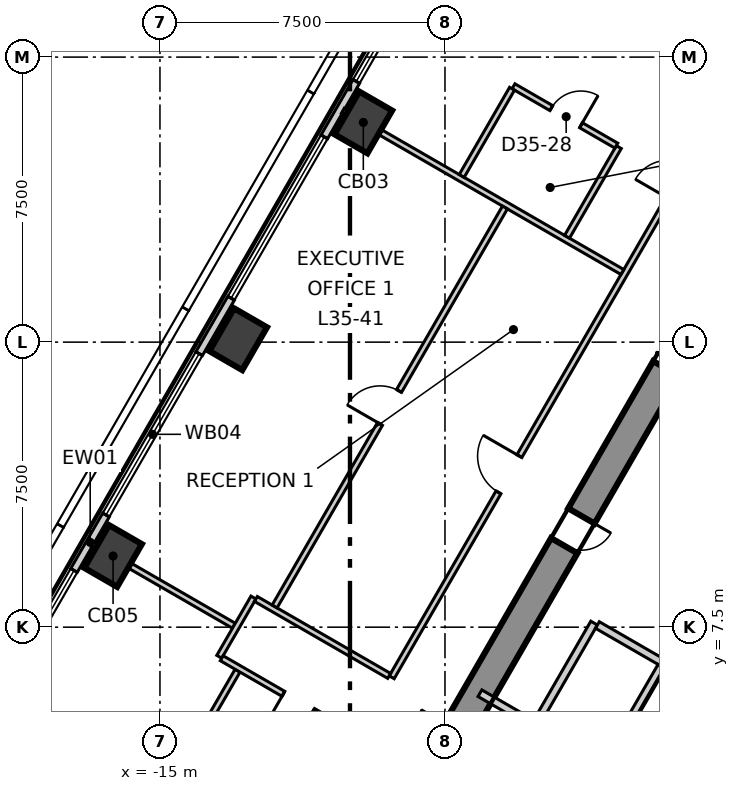
"""IFC4 building model, lengths in metres.
Left out: names, types, materials, properties, quantities, classifications, styles, units other than length and angle.
Written with IfcOpenShell. Run it as: python <this file> out.ifc"""

import sys

from ifc_helpers import new_model, si_unit, direction, frame, frame_2d, origin, origin_2d, place, context, subcontext, project, spatial, polyline, rectangle, outline, extrude, element, fill, save


model = new_model("IFC4")
c1 = context("Model", 3, precision=1e-05, world=origin(), true_north=direction((0.0, 1.0)))
c2 = subcontext(c1, "Body", "Model", "MODEL_VIEW")
j1 = project(units=[si_unit("LENGTHUNIT", "METRE"), si_unit("PLANEANGLEUNIT", "RADIAN")], contexts=[c1])
p1 = place(None, origin())
s1 = spatial("IfcSite", under=j1, at=p1, CompositionType="ELEMENT")
p2 = place(p1, origin())
s2 = spatial("IfcBuilding", under=s1, at=p2, CompositionType="ELEMENT")
p3 = place(p2, frame((0.0, 0.0, 152.3)))
s3 = spatial("IfcBuildingStorey", under=s2, at=p3, CompositionType="ELEMENT", Elevation=152.3)
p4 = place(p3, frame((1.674, 14.3, -0.3), z_axis=(0.0, 0.0, 1.0), x_axis=(-1.0, 0.0, 0.0)))
e1 = element("IfcWall", 1, at=p4, inside=s3, PredefinedType="SHEAR", context=c2, shape_type="SweptSolid", body=[
    extrude(outline(polyline([(-0.231, -0.4), (1.674, -0.4), (3.579, -0.4), (3.117, 0.4), (1.674, 0.4), (0.231, 0.4), (-0.231, -0.4)])), origin(), (0.0, 0.0, 1.0), 4.0),
])
p5 = place(p4, frame((0.974, 0.0, 0.3)))
e2 = element("IfcOpeningElement", 2, at=p5, cuts=e1, PredefinedType="OPENING", context=c2, shape_type="SweptSolid", body=[
    extrude(rectangle(XDim=1.4, YDim=2.1, at=frame_2d((0.7, 1.05))), frame((0.0, 0.41, 0.0), z_axis=(0.0, -1.0, 0.0), x_axis=(1.0, 0.0, 0.0)), (0.0, 0.0, 1.0), 0.82),
])
p6 = place(p3, frame((-1.674, 14.3, -0.3), z_axis=(0.0, 0.0, 1.0), x_axis=(-0.499995765644, -0.866027848477, 0.0)))
e3 = element("IfcWall", 3, at=p6, inside=s3, PredefinedType="SHEAR", context=c2, shape_type="SweptSolid", body=[
    extrude(outline(polyline([(-0.231, -0.4), (1.732, -0.4), (3.695, -0.4), (5.658, -0.4), (7.621, -0.4), (9.584, -0.4), (11.547, -0.4), (13.51, -0.4), (15.473, -0.4), (17.436, -0.4), (19.399, -0.4), (21.362, -0.4), (23.325, -0.4), (22.863, 0.4), (20.977, 0.4), (19.091, 0.4), (17.205, 0.4), (15.319, 0.4), (13.433, 0.4), (11.547, 0.4), (9.661, 0.4), (7.775, 0.4), (5.889, 0.4), (4.003, 0.4), (2.117, 0.4), (0.231, 0.4), (-0.231, -0.4)])), origin(), (0.0, 0.0, 1.0), 4.0),
])
p7 = place(p6, frame((10.997, 0.0, 0.3)))
e4 = element("IfcOpeningElement", 4, at=p7, cuts=e3, PredefinedType="OPENING", context=c2, shape_type="SweptSolid", body=[
    extrude(rectangle(XDim=1.1, YDim=2.1, at=frame_2d((0.55, 1.05))), frame((0.0, 0.41, 0.0), z_axis=(0.0, -1.0, 0.0), x_axis=(1.0, 0.0, 0.0)), (0.0, 0.0, 1.0), 0.82),
])
p8 = place(p6, frame((4.474, 0.0, 0.3)))
e5 = element("IfcOpeningElement", 5, at=p8, cuts=e3, PredefinedType="OPENING", context=c2, shape_type="SweptSolid", body=[
    extrude(rectangle(XDim=0.9, YDim=2.1, at=frame_2d((0.45, 1.05))), frame((0.0, 0.41, 0.0), z_axis=(0.0, -1.0, 0.0), x_axis=(1.0, 0.0, 0.0)), (0.0, 0.0, 1.0), 0.82),
])
for number, where, z_axis, x_axis in (
    (6, (-9.649, 20.781, -0.3), (0.0, 0.0, 1.0), (0.5, 0.866, 0.0)),
    (7, (-12.942, 15.077, -0.3), (0.0, 0.0, 1.0), (0.5, 0.866, 0.0)),
    (8, (-16.234, 9.373, -0.3), (0.0, 0.0, 1.0), (0.5, 0.866, 0.0)),
):
    element("IfcColumn", number, at=place(p3, frame(where, z_axis=z_axis, x_axis=x_axis)), inside=s3, PredefinedType="COLUMN", context=c2, shape_type="SweptSolid", body=[
        extrude(rectangle(XDim=1.3, YDim=1.0, at=origin_2d()), origin(), (0.0, 0.0, 1.0), 4.0),
    ])
p9 = place(p3, frame((-3.018, 33.666, 0.0), z_axis=(0.0, 0.0, 1.0), x_axis=(-0.499984613623, -0.866034286931, 0.0)))
e9 = element("IfcWall", 9, at=p9, inside=s3, PredefinedType="ELEMENTEDWALL", context=c2, shape_type="SweptSolid", body=[
    extrude(rectangle(XDim=55.274, YDim=0.2, at=frame_2d((27.637, 0.0))), origin(), (0.0, 0.0, 1.0), 3.7),
])
p10 = place(p9, frame((2.145, 0.0, 0.9)))
e10 = element("IfcOpeningElement", 10, at=p10, cuts=e9, PredefinedType="OPENING", context=c2, shape_type="SweptSolid", body=[
    extrude(rectangle(XDim=4.9, YDim=2.5, at=frame_2d((2.45, 1.25))), frame((0.0, 0.11, 0.0), z_axis=(0.0, -1.0, 0.0), x_axis=(1.0, 0.0, 0.0)), (0.0, 0.0, 1.0), 0.22),
])
p11 = place(p9, frame((8.731, 0.0, 0.9)))
e11 = element("IfcOpeningElement", 11, at=p11, cuts=e9, PredefinedType="OPENING", context=c2, shape_type="SweptSolid", body=[
    extrude(rectangle(XDim=4.9, YDim=2.5, at=frame_2d((2.45, 1.25))), frame((0.0, 0.11, 0.0), z_axis=(0.0, -1.0, 0.0), x_axis=(1.0, 0.0, 0.0)), (0.0, 0.0, 1.0), 0.22),
])
p12 = place(p9, frame((15.318, 0.0, 0.9)))
e12 = element("IfcOpeningElement", 12, at=p12, cuts=e9, PredefinedType="OPENING", context=c2, shape_type="SweptSolid", body=[
    extrude(rectangle(XDim=4.9, YDim=2.5, at=frame_2d((2.45, 1.25))), frame((0.0, 0.11, 0.0), z_axis=(0.0, -1.0, 0.0), x_axis=(1.0, 0.0, 0.0)), (0.0, 0.0, 1.0), 0.22),
])
p13 = place(p9, frame((21.904, 0.0, 0.9)))
e13 = element("IfcOpeningElement", 13, at=p13, cuts=e9, PredefinedType="OPENING", context=c2, shape_type="SweptSolid", body=[
    extrude(rectangle(XDim=4.9, YDim=2.5, at=frame_2d((2.45, 1.25))), frame((0.0, 0.11, 0.0), z_axis=(0.0, -1.0, 0.0), x_axis=(1.0, 0.0, 0.0)), (0.0, 0.0, 1.0), 0.22),
])
p14 = place(p9, frame((28.49, 0.0, 0.9)))
e14 = element("IfcOpeningElement", 14, at=p14, cuts=e9, PredefinedType="OPENING", context=c2, shape_type="SweptSolid", body=[
    extrude(rectangle(XDim=4.9, YDim=2.5, at=frame_2d((2.45, 1.25))), frame((0.0, 0.11, 0.0), z_axis=(0.0, -1.0, 0.0), x_axis=(1.0, 0.0, 0.0)), (0.0, 0.0, 1.0), 0.22),
])
p15 = place(p9, frame((35.076, 0.0, 0.9)))
e15 = element("IfcOpeningElement", 15, at=p15, cuts=e9, PredefinedType="OPENING", context=c2, shape_type="SweptSolid", body=[
    extrude(rectangle(XDim=4.9, YDim=2.5, at=frame_2d((2.45, 1.25))), frame((0.0, 0.11, 0.0), z_axis=(0.0, -1.0, 0.0), x_axis=(1.0, 0.0, 0.0)), (0.0, 0.0, 1.0), 0.22),
])
p16 = place(p9, frame((41.662, 0.0, 0.9)))
e16 = element("IfcOpeningElement", 16, at=p16, cuts=e9, PredefinedType="OPENING", context=c2, shape_type="SweptSolid", body=[
    extrude(rectangle(XDim=4.9, YDim=2.5, at=frame_2d((2.45, 1.25))), frame((0.0, 0.11, 0.0), z_axis=(0.0, -1.0, 0.0), x_axis=(1.0, 0.0, 0.0)), (0.0, 0.0, 1.0), 0.22),
])
p17 = place(p9, frame((48.248, 0.0, 0.9)))
e17 = element("IfcOpeningElement", 17, at=p17, cuts=e9, PredefinedType="OPENING", context=c2, shape_type="SweptSolid", body=[
    extrude(rectangle(XDim=4.9, YDim=2.5, at=frame_2d((2.45, 1.25))), frame((0.0, 0.11, 0.0), z_axis=(0.0, -1.0, 0.0), x_axis=(1.0, 0.0, 0.0)), (0.0, 0.0, 1.0), 0.22),
])
p18 = place(p3, frame((-8.902, 6.181, 0.0), z_axis=(0.0, 0.0, 1.0), x_axis=(0.499992688384, 0.866029625107, 0.0)))
e18 = element("IfcWall", 18, at=p18, inside=s3, PredefinedType="PARTITIONING", context=c2, shape_type="SweptSolid", body=[
    extrude(rectangle(XDim=17.804, YDim=0.15, at=frame_2d((8.902, 0.0))), origin(), (0.0, 0.0, 1.0), 3.7),
])
p19 = place(p18, frame((14.554, 0.0, 0.0)))
e19 = element("IfcOpeningElement", 19, at=p19, cuts=e18, PredefinedType="OPENING", context=c2, shape_type="SweptSolid", body=[
    extrude(rectangle(XDim=1.0, YDim=2.1, at=frame_2d((0.5, 1.05))), frame((0.0, 0.085, 0.0), z_axis=(0.0, -1.0, 0.0), x_axis=(1.0, 0.0, 0.0)), (0.0, 0.0, 1.0), 0.17),
])
p20 = place(p18, frame((5.62, 0.0, 0.0)))
e20 = element("IfcOpeningElement", 20, at=p20, cuts=e18, PredefinedType="OPENING", context=c2, shape_type="SweptSolid", body=[
    extrude(rectangle(XDim=1.1, YDim=2.1, at=frame_2d((0.55, 1.05))), frame((0.0, 0.085, 0.0), z_axis=(0.0, -1.0, 0.0), x_axis=(1.0, 0.0, 0.0)), (0.0, 0.0, 1.0), 0.17),
])
p21 = place(p3, frame((-16.771, 9.683, 0.0), z_axis=(0.0, 0.0, 1.0), x_axis=(0.866070942811, -0.499921115796, 0.0)))
e21 = element("IfcWall", 21, at=p21, inside=s3, PredefinedType="PARTITIONING", context=c2, shape_type="SweptSolid", body=[
    extrude(rectangle(XDim=4.291, YDim=0.15, at=frame_2d((2.146, 0.0))), origin(), (0.0, 0.0, 1.0), 3.2),
])
p22 = place(p3, frame((-17.321, -1.2, 0.0), z_axis=(0.0, 0.0, 1.0), x_axis=(0.500054279689, 0.865994063124, 0.0)))
e22 = element("IfcWall", 22, at=p22, inside=s3, PredefinedType="PARTITIONING", context=c2, shape_type="SweptSolid", body=[
    extrude(rectangle(XDim=8.725, YDim=0.15, at=frame_2d((4.363, 0.0))), origin(), (0.0, 0.0, 1.0), 3.7),
])
p23 = place(p3, frame((-13.44, 6.721, 0.0), z_axis=(0.0, 0.0, 1.0), x_axis=(0.499902469156, 0.866081705922, 0.0)))
e23 = element("IfcWall", 23, at=p23, inside=s3, PredefinedType="PARTITIONING", context=c2, shape_type="SweptSolid", body=[
    extrude(rectangle(XDim=1.8, YDim=0.15, at=frame_2d((0.9, 0.0))), origin(), (0.0, 0.0, 1.0), 3.7),
])
p24 = place(p3, frame((-12.475, 8.242, 0.0), z_axis=(0.0, 0.0, 1.0), x_axis=(0.866060059865, -0.499939969103, 0.0)))
e24 = element("IfcWall", 24, at=p24, inside=s3, PredefinedType="PARTITIONING", context=c2, shape_type="SweptSolid", body=[
    extrude(rectangle(XDim=4.048, YDim=0.15, at=frame_2d((2.024, 0.0))), origin(), (0.0, 0.0, 1.0), 3.7),
])
p25 = place(p3, frame((-13.375, 6.683, 0.0), z_axis=(0.0, 0.0, 1.0), x_axis=(0.866033948129, -0.499985200469, 0.0)))
e25 = element("IfcWall", 25, at=p25, inside=s3, PredefinedType="PARTITIONING", context=c2, shape_type="SweptSolid", body=[
    extrude(rectangle(XDim=4.048, YDim=0.15, at=frame_2d((2.024, 0.0))), origin(), (0.0, 0.0, 1.0), 3.7),
])
p26 = place(p25, frame((1.875, 0.0, 0.0)))
e26 = element("IfcOpeningElement", 26, at=p26, cuts=e25, PredefinedType="OPENING", context=c2, shape_type="SweptSolid", body=[
    extrude(rectangle(XDim=0.9, YDim=2.1, at=frame_2d((0.45, 1.05))), frame((0.0, 0.085, 0.0), z_axis=(0.0, -1.0, 0.0), x_axis=(1.0, 0.0, 0.0)), (0.0, 0.0, 1.0), 0.17),
])
p27 = place(p3, frame((-10.186, 21.091, 0.0), z_axis=(0.0, 0.0, 1.0), x_axis=(0.866012267213, -0.500022752519, 0.0)))
e27 = element("IfcWall", 27, at=p27, inside=s3, PredefinedType="PARTITIONING", context=c2, shape_type="SweptSolid", body=[
    extrude(rectangle(XDim=8.492, YDim=0.15, at=frame_2d((4.246, 0.0))), origin(), (0.0, 0.0, 1.0), 3.7),
])
p28 = place(p3, frame((-11.983, 8.045, 0.0), z_axis=(0.0, 0.0, 1.0), x_axis=(0.49998396455, 0.866034661658, 0.0)))
e28 = element("IfcWall", 28, at=p28, inside=s3, PredefinedType="PARTITIONING", context=c2, shape_type="SweptSolid", body=[
    extrude(rectangle(XDim=12.122, YDim=0.15, at=frame_2d((6.061, 0.0))), origin(), (0.0, 0.0, 1.0), 3.7),
])
p29 = place(p28, frame((5.547, 0.0, 0.0)))
e29 = element("IfcOpeningElement", 29, at=p29, cuts=e28, PredefinedType="OPENING", context=c2, shape_type="SweptSolid", body=[
    extrude(rectangle(XDim=1.0, YDim=2.1, at=frame_2d((0.5, 1.05))), frame((0.0, 0.085, 0.0), z_axis=(0.0, -1.0, 0.0), x_axis=(1.0, 0.0, 0.0)), (0.0, 0.0, 1.0), 0.17),
])
p30 = place(p3, frame((-4.288, 17.773, 0.0), z_axis=(0.0, 0.0, 1.0), x_axis=(0.500004325324, 0.866022906543, 0.0)))
e30 = element("IfcWall", 30, at=p30, inside=s3, PredefinedType="PARTITIONING", context=c2, shape_type="SweptSolid", body=[
    extrude(rectangle(XDim=2.724, YDim=0.15, at=frame_2d((1.362, 0.0))), origin(), (0.0, 0.0, 1.0), 3.7),
])
p31 = place(p3, frame((-5.697, 21.732, 0.0), z_axis=(0.0, 0.0, 1.0), x_axis=(0.866071089505, -0.499920861661, 0.0)))
e31 = element("IfcWall", 31, at=p31, inside=s3, PredefinedType="PARTITIONING", context=c2, shape_type="SweptSolid", body=[
    extrude(rectangle(XDim=3.125, YDim=0.15, at=frame_2d((1.562, 0.0))), origin(), (0.0, 0.0, 1.0), 3.7),
])
p32 = place(p31, frame((1.15, 0.0, 0.0)))
e32 = element("IfcOpeningElement", 32, at=p32, cuts=e31, PredefinedType="OPENING", context=c2, shape_type="SweptSolid", body=[
    extrude(rectangle(XDim=0.9, YDim=2.1, at=frame_2d((0.45, 1.05))), frame((0.0, 0.085, 0.0), z_axis=(0.0, -1.0, 0.0), x_axis=(1.0, 0.0, 0.0)), (0.0, 0.0, 1.0), 0.17),
])
p33 = place(p3, frame((-7.06, 19.373, 0.0), z_axis=(0.0, 0.0, 1.0), x_axis=(0.499993606316, 0.866029095148, 0.0)))
e33 = element("IfcWall", 33, at=p33, inside=s3, PredefinedType="PARTITIONING", context=c2, shape_type="SweptSolid", body=[
    extrude(rectangle(XDim=2.65, YDim=0.15, at=frame_2d((1.325, 0.0))), origin(), (0.0, 0.0, 1.0), 3.7),
])
p34 = place(p3, frame((-6.58, 5.762, 0.0), z_axis=(0.0, 0.0, 1.0), x_axis=(0.866029704776, -0.49999255039, 0.0)))
e34 = element("IfcWall", 34, at=p34, inside=s3, PredefinedType="SOLIDWALL", context=c2, shape_type="SweptSolid", body=[
    extrude(rectangle(XDim=3.782, YDim=0.2, at=frame_2d((1.891, 0.0))), origin(), (0.0, 0.0, 1.0), 3.7),
])
p35 = place(p34, frame((2.279, 0.0, 0.0)))
e35 = element("IfcOpeningElement", 35, at=p35, cuts=e34, PredefinedType="OPENING", context=c2, shape_type="SweptSolid", body=[
    extrude(rectangle(XDim=0.9, YDim=2.1, at=frame_2d((0.45, 1.05))), frame((0.0, 0.11, 0.0), z_axis=(0.0, -1.0, 0.0), x_axis=(1.0, 0.0, 0.0)), (0.0, 0.0, 1.0), 0.22),
])
p36 = place(p3, frame((-5.076, 5.009, 0.0), z_axis=(0.0, 0.0, 1.0), x_axis=(0.50002537861, 0.866010750942, 0.0)))
e36 = element("IfcWall", 36, at=p36, inside=s3, PredefinedType="SOLIDWALL", context=c2, shape_type="SweptSolid", body=[
    extrude(rectangle(XDim=3.0, YDim=0.2, at=frame_2d((1.5, 0.0))), origin(), (0.0, 0.0, 1.0), 3.7),
])
p37 = place(p3, frame((-3.489, 7.557, 0.0), z_axis=(0.0, 0.0, 1.0), x_axis=(0.866010750942, -0.50002537861, 0.0)))
e37 = element("IfcWall", 37, at=p37, inside=s3, PredefinedType="SOLIDWALL", context=c2, shape_type="SweptSolid", body=[
    extrude(rectangle(XDim=2.0, YDim=0.2, at=frame_2d((1.0, 0.0))), origin(), (0.0, 0.0, 1.0), 3.7),
])
p38 = place(p3, frame((-3.257, 3.959, 0.0), z_axis=(0.0, 0.0, 1.0), x_axis=(0.50012328804, 0.865954211699, 0.0)))
e38 = element("IfcWall", 38, at=p38, inside=s3, PredefinedType="SOLIDWALL", context=c2, shape_type="SweptSolid", body=[
    extrude(rectangle(XDim=2.9, YDim=0.2, at=frame_2d((1.45, 0.0))), origin(), (0.0, 0.0, 1.0), 3.7),
])
p39 = place(p11, origin())
e39 = element("IfcWindow", 39, at=p39, inside=s3, PartitioningType="SINGLE_PANEL", PredefinedType="WINDOW", context=c2, shape_type="SweptSolid", body=[
    extrude(rectangle(XDim=4.9, YDim=2.5, at=frame_2d((2.45, 1.25))), frame((0.0, 0.03, 0.0), z_axis=(0.0, -1.0, 0.0), x_axis=(1.0, 0.0, 0.0)), (0.0, 0.0, 1.0), 0.06),
])
fill(e11, e39)
p40 = place(p12, origin())
e40 = element("IfcWindow", 40, at=p40, inside=s3, PartitioningType="SINGLE_PANEL", PredefinedType="WINDOW", context=c2, shape_type="SweptSolid", body=[
    extrude(rectangle(XDim=4.9, YDim=2.5, at=frame_2d((2.45, 1.25))), frame((0.0, 0.03, 0.0), z_axis=(0.0, -1.0, 0.0), x_axis=(1.0, 0.0, 0.0)), (0.0, 0.0, 1.0), 0.06),
])
fill(e12, e40)
p41 = place(p13, origin())
e41 = element("IfcWindow", 41, at=p41, inside=s3, PartitioningType="SINGLE_PANEL", PredefinedType="WINDOW", context=c2, shape_type="SweptSolid", body=[
    extrude(rectangle(XDim=4.9, YDim=2.5, at=frame_2d((2.45, 1.25))), frame((0.0, 0.03, 0.0), z_axis=(0.0, -1.0, 0.0), x_axis=(1.0, 0.0, 0.0)), (0.0, 0.0, 1.0), 0.06),
])
fill(e13, e41)
p42 = place(p14, origin())
e42 = element("IfcWindow", 42, at=p42, inside=s3, PartitioningType="SINGLE_PANEL", PredefinedType="WINDOW", context=c2, shape_type="SweptSolid", body=[
    extrude(rectangle(XDim=4.9, YDim=2.5, at=frame_2d((2.45, 1.25))), frame((0.0, 0.03, 0.0), z_axis=(0.0, -1.0, 0.0), x_axis=(1.0, 0.0, 0.0)), (0.0, 0.0, 1.0), 0.06),
])
fill(e14, e42)
p43 = place(p32, origin())
e43 = element("IfcDoor", 43, at=p43, inside=s3, OperationType="SINGLE_SWING_LEFT", PredefinedType="DOOR", context=c2, shape_type="SweptSolid", body=[
    extrude(rectangle(XDim=0.9, YDim=2.1, at=frame_2d((0.45, 1.05))), frame((0.0, 0.025, 0.0), z_axis=(0.0, -1.0, 0.0), x_axis=(1.0, 0.0, 0.0)), (0.0, 0.0, 1.0), 0.05),
])
fill(e32, e43)
p44 = place(p20, origin())
e44 = element("IfcDoor", 44, at=p44, inside=s3, OperationType="SINGLE_SWING_LEFT", PredefinedType="DOOR", context=c2, shape_type="SweptSolid", body=[
    extrude(rectangle(XDim=1.1, YDim=2.1, at=frame_2d((0.55, 1.05))), frame((0.0, 0.025, 0.0), z_axis=(0.0, -1.0, 0.0), x_axis=(1.0, 0.0, 0.0)), (0.0, 0.0, 1.0), 0.05),
])
fill(e20, e44)
p45 = place(p29, origin())
e45 = element("IfcDoor", 45, at=p45, inside=s3, OperationType="SINGLE_SWING_RIGHT", PredefinedType="DOOR", context=c2, shape_type="SweptSolid", body=[
    extrude(rectangle(XDim=1.0, YDim=2.1, at=frame_2d((0.5, 1.05))), frame((0.0, 0.025, 0.0), z_axis=(0.0, -1.0, 0.0), x_axis=(1.0, 0.0, 0.0)), (0.0, 0.0, 1.0), 0.05),
])
fill(e29, e45)
p46 = place(p26, origin())
e46 = element("IfcDoor", 46, at=p46, inside=s3, OperationType="SINGLE_SWING_LEFT", PredefinedType="DOOR", context=c2, shape_type="SweptSolid", body=[
    extrude(rectangle(XDim=0.9, YDim=2.1, at=frame_2d((0.45, 1.05))), frame((0.0, 0.025, 0.0), z_axis=(0.0, -1.0, 0.0), x_axis=(1.0, 0.0, 0.0)), (0.0, 0.0, 1.0), 0.05),
])
fill(e26, e46)
p47 = place(p8, origin())
e47 = element("IfcDoor", 47, at=p47, inside=s3, OperationType="SINGLE_SWING_RIGHT", PredefinedType="DOOR", context=c2, shape_type="SweptSolid", body=[
    extrude(rectangle(XDim=0.9, YDim=2.1, at=frame_2d((0.45, 1.05))), frame((0.0, 0.025, 0.0), z_axis=(0.0, -1.0, 0.0), x_axis=(1.0, 0.0, 0.0)), (0.0, 0.0, 1.0), 0.05),
])
fill(e5, e47)
save(model, sys.argv[1])
